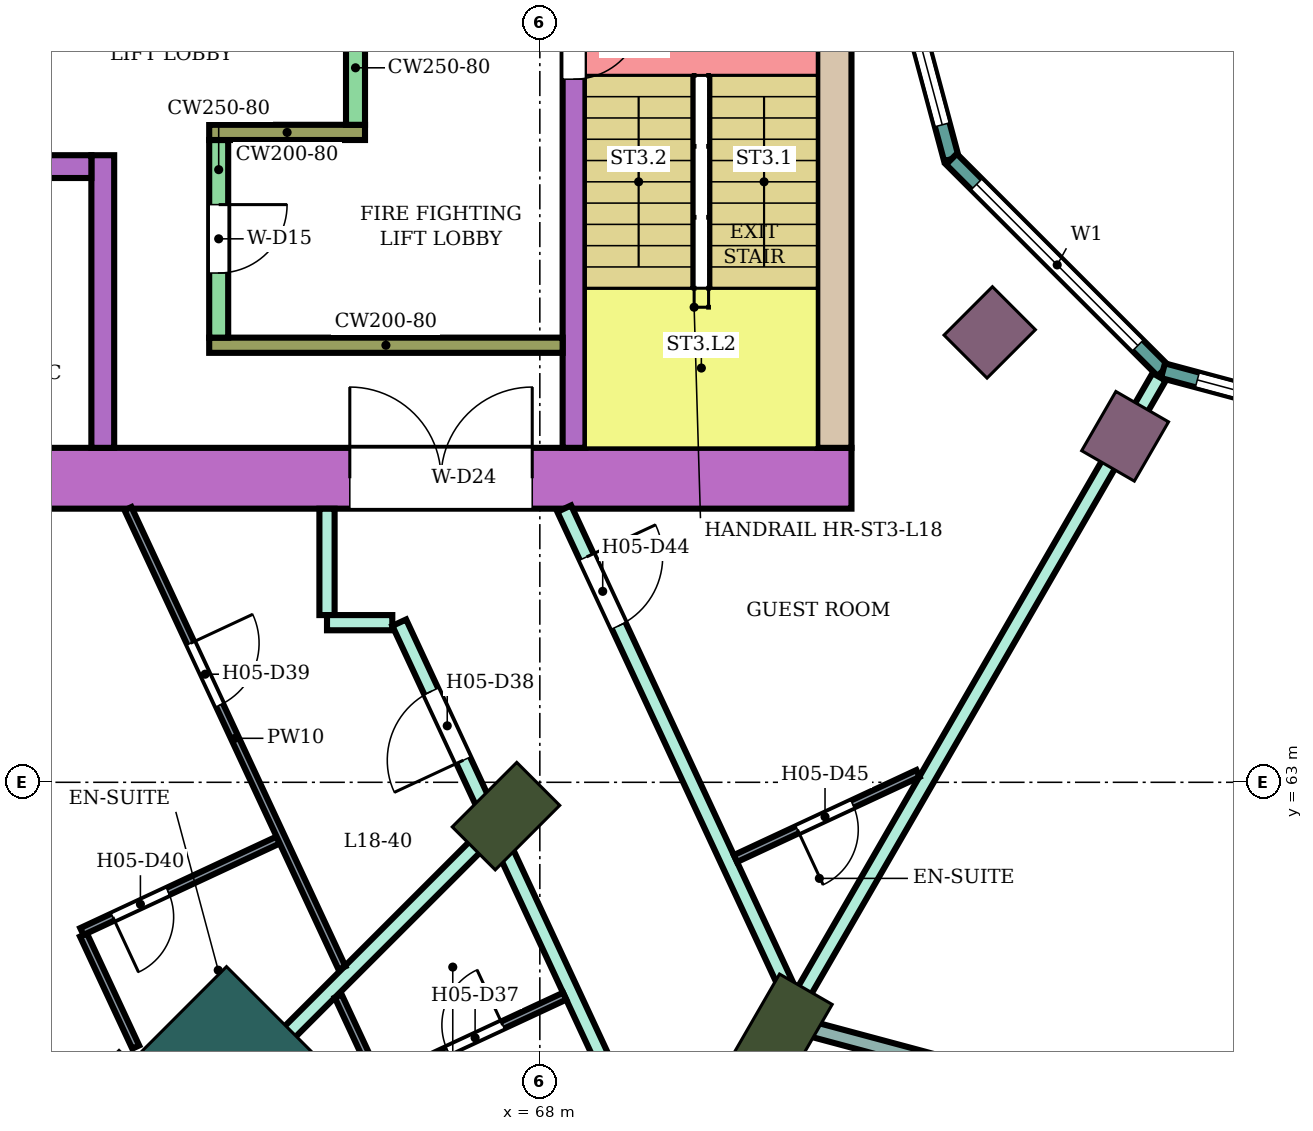
"""IFC4 building model, lengths in metres.
Left out: names, types, materials, properties, quantities, classifications, styles, units other than length and angle.
Written with IfcOpenShell. Run it as: python <this file> out.ifc"""

import sys

from ifc_helpers import new_model, si_unit, direction, frame, frame_2d, origin, origin_2d, place, context, subcontext, project, spatial, rectangle, extrude, element, fill, save


model = new_model("IFC4")
c1 = context("Model", 3, precision=1e-05, world=origin(), true_north=direction((0.0, 1.0)))
c2 = subcontext(c1, "Body", "Model", "MODEL_VIEW")
j1 = project(units=[si_unit("LENGTHUNIT", "METRE"), si_unit("PLANEANGLEUNIT", "RADIAN")], contexts=[c1])
p1 = place(None, origin())
s1 = spatial("IfcSite", under=j1, at=p1, CompositionType="ELEMENT")
p2 = place(p1, origin())
s2 = spatial("IfcBuilding", under=s1, at=p2, CompositionType="ELEMENT")
p3 = place(p2, frame((0.0, 0.0, 82.4)))
s3 = spatial("IfcBuildingStorey", under=s2, at=p3, CompositionType="ELEMENT", Elevation=82.4)
for number, where, z_axis, x_axis in (
    (1, (67.555, 62.555, 0.0), (0.0, 0.0, 1.0), (-0.707, -0.707, 0.0)),
    (2, (71.2, 59.758, 0.0), (0.0, 0.0, 1.0), (-0.5, -0.866, 0.0)),
):
    element("IfcColumn", number, at=place(p3, frame(where, z_axis=z_axis, x_axis=x_axis)), inside=s3, PredefinedType="COLUMN", context=c2, shape_type="SweptSolid", body=[
        extrude(rectangle(XDim=1.2, YDim=0.8, at=origin_2d()), origin(), (0.0, 0.0, 1.0), 3.8),
    ])
for number, where, z_axis, x_axis in (
    (3, (73.919, 68.919, 0.0), (0.0, 0.0, 1.0), (-0.707, -0.707, 0.0)),
    (4, (75.7, 67.552, 0.0), (0.0, 0.0, 1.0), (-0.5, -0.866, 0.0)),
):
    element("IfcColumn", number, at=place(p3, frame(where, z_axis=z_axis, x_axis=x_axis)), inside=s3, PredefinedType="COLUMN", context=c2, shape_type="SweptSolid", body=[
        extrude(rectangle(XDim=0.9, YDim=0.8, at=origin_2d()), origin(), (0.0, 0.0, 1.0), 3.8),
    ])
p4 = place(p3, frame((64.09, 59.09, 0.0), z_axis=(0.0, 0.0, 1.0), x_axis=(-0.707106781187, -0.707106781187, 0.0)))
e5 = element("IfcColumn", 5, at=p4, inside=s3, PredefinedType="COLUMN", context=c2, shape_type="SweptSolid", body=[
    extrude(rectangle(XDim=1.8, YDim=2.4, at=origin_2d()), origin(), (0.0, 0.0, 1.0), 3.8),
])
p5 = place(p3, frame((72.1, 67.0, 0.0), z_axis=(0.0, 0.0, 1.0), x_axis=(-1.0, 0.0, 0.0)))
e6 = element("IfcWall", 6, at=p5, inside=s3, PredefinedType="SHEAR", context=c2, shape_type="SweptSolid", body=[
    extrude(rectangle(XDim=14.7, YDim=0.8, at=frame_2d((7.35, 0.0))), origin(), (0.0, 0.0, 1.0), 3.48),
])
p6 = place(p5, frame((4.2, 0.0, 0.0)))
e7 = element("IfcOpeningElement", 7, at=p6, cuts=e6, PredefinedType="OPENING", context=c2, shape_type="SweptSolid", body=[
    extrude(rectangle(XDim=2.4, YDim=2.4, at=frame_2d((1.2, 1.2))), frame((0.0, 0.41, 0.0), z_axis=(0.0, -1.0, 0.0), x_axis=(1.0, 0.0, 0.0)), (0.0, 0.0, 1.0), 0.82),
])
p7 = place(p3, frame((71.875, 75.0, 0.0), z_axis=(0.0, 0.0, 1.0), x_axis=(0.0, -1.0, 0.0)))
e8 = element("IfcWall", 8, at=p7, inside=s3, PredefinedType="SHEAR", context=c2, shape_type="SweptSolid", body=[
    extrude(rectangle(XDim=7.6, YDim=0.45, at=frame_2d((3.8, 0.0))), origin(), (0.0, 0.0, 1.0), 3.48),
])
p8 = place(p3, frame((68.45, 75.0, 0.0), z_axis=(0.0, 0.0, 1.0), x_axis=(0.0, -1.0, 0.0)))
e9 = element("IfcWall", 9, at=p8, inside=s3, PredefinedType="SHEAR", context=c2, shape_type="SweptSolid", body=[
    extrude(rectangle(XDim=7.6, YDim=0.3, at=frame_2d((3.8, 0.0))), origin(), (0.0, 0.0, 1.0), 3.48),
])
p9 = place(p8, frame((1.85, 0.0, 0.0)))
e10 = element("IfcOpeningElement", 10, at=p9, cuts=e9, PredefinedType="OPENING", context=c2, shape_type="SweptSolid", body=[
    extrude(rectangle(XDim=0.9, YDim=2.1, at=frame_2d((0.45, 1.05))), frame((0.0, 0.16, 0.0), z_axis=(0.0, -1.0, 0.0), x_axis=(1.0, 0.0, 0.0)), (0.0, 0.0, 1.0), 0.32),
])
p10 = place(p3, frame((68.3, 68.75, 0.0), z_axis=(0.0, 0.0, 1.0), x_axis=(-1.0, 0.0, 0.0)))
e11 = element("IfcWall", 11, at=p10, inside=s3, PredefinedType="SHEAR", context=c2, shape_type="SweptSolid", body=[
    extrude(rectangle(XDim=4.65, YDim=0.2, at=frame_2d((2.325, 0.0))), origin(), (0.0, 0.0, 1.0), 3.48),
])
p11 = place(p3, frame((63.775, 71.45, 0.0), z_axis=(0.0, 0.0, 1.0), x_axis=(0.0, -1.0, 0.0)))
e12 = element("IfcWall", 12, at=p11, inside=s3, PredefinedType="SHEAR", context=c2, shape_type="SweptSolid", body=[
    extrude(rectangle(XDim=2.6, YDim=0.25, at=frame_2d((1.3, 0.0))), origin(), (0.0, 0.0, 1.0), 3.48),
])
p12 = place(p11, frame((0.85, 0.0, 0.0)))
e13 = element("IfcOpeningElement", 13, at=p12, cuts=e12, PredefinedType="OPENING", context=c2, shape_type="SweptSolid", body=[
    extrude(rectangle(XDim=0.9, YDim=2.1, at=frame_2d((0.45, 1.05))), frame((0.0, 0.135, 0.0), z_axis=(0.0, -1.0, 0.0), x_axis=(1.0, 0.0, 0.0)), (0.0, 0.0, 1.0), 0.27),
])
p13 = place(p3, frame((65.7, 71.55, 0.0), z_axis=(0.0, 0.0, 1.0), x_axis=(-1.0, 0.0, 0.0)))
e14 = element("IfcWall", 14, at=p13, inside=s3, PredefinedType="SHEAR", context=c2, shape_type="SweptSolid", body=[
    extrude(rectangle(XDim=2.05, YDim=0.2, at=frame_2d((1.025, 0.0))), origin(), (0.0, 0.0, 1.0), 3.48),
])
p14 = place(p3, frame((65.575, 73.15, 0.0), z_axis=(0.0, 0.0, 1.0), x_axis=(0.0, -1.0, 0.0)))
e15 = element("IfcWall", 15, at=p14, inside=s3, PredefinedType="SHEAR", context=c2, shape_type="SweptSolid", body=[
    extrude(rectangle(XDim=1.5, YDim=0.25, at=frame_2d((0.75, 0.0))), origin(), (0.0, 0.0, 1.0), 3.48),
])
p15 = place(p3, frame((62.25, 71.25, 0.0), z_axis=(0.0, 0.0, 1.0), x_axis=(0.0, -1.0, 0.0)))
e16 = element("IfcWall", 16, at=p15, inside=s3, PredefinedType="SHEAR", context=c2, shape_type="SweptSolid", body=[
    extrude(rectangle(XDim=3.85, YDim=0.3, at=frame_2d((1.925, 0.0))), origin(), (0.0, 0.0, 1.0), 3.48),
])
p16 = place(p3, frame((62.1, 71.1, 0.0), z_axis=(0.0, 0.0, 1.0), x_axis=(-1.0, 0.0, 0.0)))
e17 = element("IfcWall", 17, at=p16, inside=s3, PredefinedType="SHEAR", context=c2, shape_type="SweptSolid", body=[
    extrude(rectangle(XDim=4.7, YDim=0.3, at=frame_2d((2.35, 0.0))), origin(), (0.0, 0.0, 1.0), 3.48),
])
p17 = place(p16, frame((0.725, 0.0, 0.0)))
e18 = element("IfcOpeningElement", 18, at=p17, cuts=e17, PredefinedType="OPENING", context=c2, shape_type="SweptSolid", body=[
    extrude(rectangle(XDim=0.9, YDim=2.1, at=frame_2d((0.45, 1.05))), frame((0.0, 0.16, 0.0), z_axis=(0.0, -1.0, 0.0), x_axis=(1.0, 0.0, 0.0)), (0.0, 0.0, 1.0), 0.32),
])
p18 = place(p16, frame((3.075, 0.0, 0.0)))
e19 = element("IfcOpeningElement", 19, at=p18, cuts=e17, PredefinedType="OPENING", context=c2, shape_type="SweptSolid", body=[
    extrude(rectangle(XDim=0.9, YDim=2.1, at=frame_2d((0.45, 1.05))), frame((0.0, 0.16, 0.0), z_axis=(0.0, -1.0, 0.0), x_axis=(1.0, 0.0, 0.0)), (0.0, 0.0, 1.0), 0.32),
])
p19 = place(p3, frame((72.396, 75.0, 0.0), z_axis=(0.0, 0.0, 1.0), x_axis=(0.258789828301, -0.965933654434, 0.0)))
e20 = element("IfcWall", 20, at=p19, inside=s3, PredefinedType="NOTDEFINED", context=c2, shape_type="SweptSolid", body=[
    extrude(rectangle(XDim=3.936, YDim=0.2, at=frame_2d((1.968, 0.0))), origin(), (0.0, 0.0, 1.0), 3.8),
])
p20 = place(p19, frame((0.468, 0.0, 0.9)))
e21 = element("IfcOpeningElement", 21, at=p20, cuts=e20, PredefinedType="OPENING", context=c2, shape_type="SweptSolid", body=[
    extrude(rectangle(XDim=3.0, YDim=2.3, at=frame_2d((1.5, 1.15))), frame((0.0, 0.11, 0.0), z_axis=(0.0, -1.0, 0.0), x_axis=(1.0, 0.0, 0.0)), (0.0, 0.0, 1.0), 0.22),
])
p21 = place(p3, frame((73.415, 71.198, 0.0), z_axis=(0.0, 0.0, 1.0), x_axis=(0.707106781187, -0.707106781187, 0.0)))
e22 = element("IfcWall", 22, at=p21, inside=s3, PredefinedType="NOTDEFINED", context=c2, shape_type="SweptSolid", body=[
    extrude(rectangle(XDim=3.936, YDim=0.2, at=frame_2d((1.968, 0.0))), origin(), (0.0, 0.0, 1.0), 3.8),
])
p22 = place(p21, frame((0.468, 0.0, 0.9)))
e23 = element("IfcOpeningElement", 23, at=p22, cuts=e22, PredefinedType="OPENING", context=c2, shape_type="SweptSolid", body=[
    extrude(rectangle(XDim=3.0, YDim=2.3, at=frame_2d((1.5, 1.15))), frame((0.0, 0.11, 0.0), z_axis=(0.0, -1.0, 0.0), x_axis=(1.0, 0.0, 0.0)), (0.0, 0.0, 1.0), 0.22),
])
p23 = place(p3, frame((76.198, 68.415, 0.0), z_axis=(0.0, 0.0, 1.0), x_axis=(0.965933654434, -0.258789828301, 0.0)))
e24 = element("IfcWall", 24, at=p23, inside=s3, PredefinedType="NOTDEFINED", context=c2, shape_type="SweptSolid", body=[
    extrude(rectangle(XDim=3.936, YDim=0.2, at=frame_2d((1.968, 0.0))), origin(), (0.0, 0.0, 1.0), 3.8),
])
p24 = place(p23, frame((0.468, 0.0, 0.9)))
e25 = element("IfcOpeningElement", 25, at=p24, cuts=e24, PredefinedType="OPENING", context=c2, shape_type="SweptSolid", body=[
    extrude(rectangle(XDim=3.0, YDim=2.3, at=frame_2d((1.5, 1.15))), frame((0.0, 0.11, 0.0), z_axis=(0.0, -1.0, 0.0), x_axis=(1.0, 0.0, 0.0)), (0.0, 0.0, 1.0), 0.22),
])
p25 = place(p3, frame((63.593, 58.599, 0.0), z_axis=(0.0, 0.0, 1.0), x_axis=(0.707292874152, 0.706920639233, 0.0)))
e26 = element("IfcWall", 26, at=p25, inside=s3, PredefinedType="PARTITIONING", context=c2, shape_type="SweptSolid", body=[
    extrude(rectangle(XDim=5.247, YDim=0.2, at=frame_2d((2.624, 0.0))), origin(), (0.0, 0.0, 1.0), 3.35),
])
p26 = place(p3, frame((65.2, 65.2, 0.0), z_axis=(0.0, 0.0, 1.0), x_axis=(0.0, 1.0, 0.0)))
e27 = element("IfcWall", 27, at=p26, inside=s3, PredefinedType="PARTITIONING", context=c2, shape_type="SweptSolid", body=[
    extrude(rectangle(XDim=1.399, YDim=0.2, at=frame_2d((0.7, 0.0))), origin(), (0.0, 0.0, 1.0), 3.35),
])
p27 = place(p3, frame((65.2, 65.1, 0.0), z_axis=(0.0, 0.0, 1.0), x_axis=(1.0, 0.0, 0.0)))
e28 = element("IfcWall", 28, at=p27, inside=s3, PredefinedType="PARTITIONING", context=c2, shape_type="SweptSolid", body=[
    extrude(rectangle(XDim=0.859, YDim=0.2, at=frame_2d((0.43, 0.0))), origin(), (0.0, 0.0, 1.0), 3.35),
])
p28 = place(p3, frame((66.15, 65.1, 0.0), z_axis=(0.0, 0.0, 1.0), x_axis=(0.421874842351, -0.906654078131, 0.0)))
e29 = element("IfcWall", 29, at=p28, inside=s3, PredefinedType="PARTITIONING", context=c2, shape_type="SweptSolid", body=[
    extrude(rectangle(XDim=8.228, YDim=0.2, at=frame_2d((4.114, 0.0))), origin(), (0.0, 0.0, 1.0), 3.35),
])
p29 = place(p28, frame((6.748, 0.0, 0.0)))
e30 = element("IfcOpeningElement", 30, at=p29, cuts=e29, PredefinedType="OPENING", context=c2, shape_type="SweptSolid", body=[
    extrude(rectangle(XDim=1.0, YDim=2.1, at=frame_2d((0.5, 1.05))), frame((0.0, 0.11, 0.0), z_axis=(0.0, -1.0, 0.0), x_axis=(1.0, 0.0, 0.0)), (0.0, 0.0, 1.0), 0.22),
])
p30 = place(p28, frame((0.997, 0.0, 0.0)))
e31 = element("IfcOpeningElement", 31, at=p30, cuts=e29, PredefinedType="OPENING", context=c2, shape_type="SweptSolid", body=[
    extrude(rectangle(XDim=1.0, YDim=2.1, at=frame_2d((0.5, 1.05))), frame((0.0, 0.11, 0.0), z_axis=(0.0, -1.0, 0.0), x_axis=(1.0, 0.0, 0.0)), (0.0, 0.0, 1.0), 0.22),
])
p31 = place(p3, frame((68.321, 66.6, 0.0), z_axis=(0.0, 0.0, 1.0), x_axis=(0.421914092414, -0.906635813666, 0.0)))
e32 = element("IfcWall", 32, at=p31, inside=s3, PredefinedType="PARTITIONING", context=c2, shape_type="SweptSolid", body=[
    extrude(rectangle(XDim=7.459, YDim=0.2, at=frame_2d((3.73, 0.0))), origin(), (0.0, 0.0, 1.0), 3.35),
])
p32 = place(p31, frame((0.7, 0.0, 0.0)))
e33 = element("IfcOpeningElement", 33, at=p32, cuts=e32, PredefinedType="OPENING", context=c2, shape_type="SweptSolid", body=[
    extrude(rectangle(XDim=1.0, YDim=2.1, at=frame_2d((0.5, 1.05))), frame((0.0, 0.11, 0.0), z_axis=(0.0, -1.0, 0.0), x_axis=(1.0, 0.0, 0.0)), (0.0, 0.0, 1.0), 0.22),
])
p33 = place(p3, frame((71.459, 60.218, 0.0), z_axis=(0.0, 0.0, 1.0), x_axis=(0.500232027118, 0.865891401416, 0.0)))
e34 = element("IfcWall", 34, at=p33, inside=s3, PredefinedType="PARTITIONING", context=c2, shape_type="SweptSolid", body=[
    extrude(rectangle(XDim=9.372, YDim=0.2, at=frame_2d((4.686, 0.0))), origin(), (0.0, 0.0, 1.0), 3.35),
])
p34 = place(p3, frame((71.498, 59.774, 0.0), z_axis=(0.0, 0.0, 1.0), x_axis=(0.965911938046, -0.258870871168, 0.0)))
e35 = element("IfcWall", 35, at=p34, inside=s3, PredefinedType="PARTITIONING", context=c2, shape_type="SweptSolid", body=[
    extrude(rectangle(XDim=8.752, YDim=0.2, at=frame_2d((4.376, 0.0))), origin(), (0.0, 0.0, 1.0), 2.98),
])
p35 = place(p34, frame((4.701, 0.0, 0.0)))
e36 = element("IfcOpeningElement", 36, at=p35, cuts=e35, PredefinedType="OPENING", context=c2, shape_type="SweptSolid", body=[
    extrude(rectangle(XDim=1.8, YDim=2.1, at=frame_2d((0.9, 1.05))), frame((0.0, 0.11, 0.0), z_axis=(0.0, -1.0, 0.0), x_axis=(1.0, 0.0, 0.0)), (0.0, 0.0, 1.0), 0.22),
])
p36 = place(p3, frame((61.996, 60.992, 0.0), z_axis=(0.0, 0.0, 1.0), x_axis=(0.422318684634, -0.906447421867, 0.0)))
e37 = element("IfcWall", 37, at=p36, inside=s3, PredefinedType="PARTITIONING", context=c2, shape_type="SweptSolid", body=[
    extrude(rectangle(XDim=1.627, YDim=0.1, at=frame_2d((0.814, 0.0))), origin(), (0.0, 0.0, 1.0), 3.35),
])
p37 = place(p3, frame((61.975, 61.037, 0.0), z_axis=(0.0, 0.0, 1.0), x_axis=(0.906360368959, 0.422505481125, 0.0)))
e38 = element("IfcWall", 38, at=p37, inside=s3, PredefinedType="PARTITIONING", context=c2, shape_type="SweptSolid", body=[
    extrude(rectangle(XDim=2.849, YDim=0.1, at=frame_2d((1.425, 0.0))), origin(), (0.0, 0.0, 1.0), 3.35),
])
p38 = place(p37, frame((0.45, 0.0, 0.0)))
e39 = element("IfcOpeningElement", 39, at=p38, cuts=e38, PredefinedType="OPENING", context=c2, shape_type="SweptSolid", body=[
    extrude(rectangle(XDim=0.8, YDim=2.1, at=frame_2d((0.4, 1.05))), frame((0.0, 0.06, 0.0), z_axis=(0.0, -1.0, 0.0), x_axis=(1.0, 0.0, 0.0)), (0.0, 0.0, 1.0), 0.12),
])
p39 = place(p3, frame((62.582, 66.6, 0.0), z_axis=(0.0, 0.0, 1.0), x_axis=(0.422283870085, -0.906463641337, 0.0)))
e40 = element("IfcWall", 40, at=p39, inside=s3, PredefinedType="PARTITIONING", context=c2, shape_type="SweptSolid", body=[
    extrude(rectangle(XDim=6.666, YDim=0.1, at=frame_2d((3.333, 0.0))), origin(), (0.0, 0.0, 1.0), 3.35),
])
p40 = place(p39, frame((1.953, 0.0, 0.0)))
e41 = element("IfcOpeningElement", 41, at=p40, cuts=e40, PredefinedType="OPENING", context=c2, shape_type="SweptSolid", body=[
    extrude(rectangle(XDim=0.9, YDim=2.1, at=frame_2d((0.45, 1.05))), frame((0.0, 0.06, 0.0), z_axis=(0.0, -1.0, 0.0), x_axis=(1.0, 0.0, 0.0)), (0.0, 0.0, 1.0), 0.12),
])
p41 = place(p3, frame((65.348, 60.188, 0.0), z_axis=(0.0, 0.0, 1.0), x_axis=(0.422387529151, -0.906415343657, 0.0)))
e42 = element("IfcWall", 42, at=p41, inside=s3, PredefinedType="PARTITIONING", context=c2, shape_type="SweptSolid", body=[
    extrude(rectangle(XDim=1.208, YDim=0.1, at=frame_2d((0.604, 0.0))), origin(), (0.0, 0.0, 1.0), 3.35),
])
p42 = place(p3, frame((65.879, 59.048, 0.0), z_axis=(0.0, 0.0, 1.0), x_axis=(0.906746039995, 0.421677150144, 0.0)))
e43 = element("IfcWall", 43, at=p42, inside=s3, PredefinedType="PARTITIONING", context=c2, shape_type="SweptSolid", body=[
    extrude(rectangle(XDim=2.7, YDim=0.1, at=frame_2d((1.35, 0.0))), origin(), (0.0, 0.0, 1.0), 3.35),
])
p43 = place(p42, frame((1.0, 0.0, 0.0)))
e44 = element("IfcOpeningElement", 44, at=p43, cuts=e43, PredefinedType="OPENING", context=c2, shape_type="SweptSolid", body=[
    extrude(rectangle(XDim=0.8, YDim=2.1, at=frame_2d((0.4, 1.05))), frame((0.0, 0.06, 0.0), z_axis=(0.0, -1.0, 0.0), x_axis=(1.0, 0.0, 0.0)), (0.0, 0.0, 1.0), 0.12),
])
p44 = place(p3, frame((70.574, 61.997, 0.0), z_axis=(0.0, 0.0, 1.0), x_axis=(0.906503026865, 0.422199315826, 0.0)))
e45 = element("IfcWall", 45, at=p44, inside=s3, PredefinedType="PARTITIONING", context=c2, shape_type="SweptSolid", body=[
    extrude(rectangle(XDim=2.65, YDim=0.1, at=frame_2d((1.325, 0.0))), origin(), (0.0, 0.0, 1.0), 3.35),
])
p45 = place(p44, frame((0.9, 0.0, 0.0)))
e46 = element("IfcOpeningElement", 46, at=p45, cuts=e45, PredefinedType="OPENING", context=c2, shape_type="SweptSolid", body=[
    extrude(rectangle(XDim=0.8, YDim=2.1, at=frame_2d((0.4, 1.05))), frame((0.0, 0.06, 0.0), z_axis=(0.0, -1.0, 0.0), x_axis=(1.0, 0.0, 0.0)), (0.0, 0.0, 1.0), 0.12),
])
p46 = place(p20, origin())
e47 = element("IfcWindow", 47, at=p46, inside=s3, PartitioningType="SINGLE_PANEL", PredefinedType="WINDOW", context=c2, shape_type="SweptSolid", body=[
    extrude(rectangle(XDim=3.0, YDim=2.3, at=frame_2d((1.5, 1.15))), frame((0.0, 0.03, 0.0), z_axis=(0.0, -1.0, 0.0), x_axis=(1.0, 0.0, 0.0)), (0.0, 0.0, 1.0), 0.06),
])
fill(e21, e47)
p47 = place(p22, origin())
e48 = element("IfcWindow", 48, at=p47, inside=s3, PartitioningType="SINGLE_PANEL", PredefinedType="WINDOW", context=c2, shape_type="SweptSolid", body=[
    extrude(rectangle(XDim=3.0, YDim=2.3, at=frame_2d((1.5, 1.15))), frame((0.0, 0.03, 0.0), z_axis=(0.0, -1.0, 0.0), x_axis=(1.0, 0.0, 0.0)), (0.0, 0.0, 1.0), 0.06),
])
fill(e23, e48)
p48 = place(p24, origin())
e49 = element("IfcWindow", 49, at=p48, inside=s3, PartitioningType="SINGLE_PANEL", PredefinedType="WINDOW", context=c2, shape_type="SweptSolid", body=[
    extrude(rectangle(XDim=3.0, YDim=2.3, at=frame_2d((1.5, 1.15))), frame((0.0, 0.03, 0.0), z_axis=(0.0, -1.0, 0.0), x_axis=(1.0, 0.0, 0.0)), (0.0, 0.0, 1.0), 0.06),
])
fill(e25, e49)
p49 = place(p43, origin())
e50 = element("IfcDoor", 50, at=p49, inside=s3, OperationType="SINGLE_SWING_RIGHT", PredefinedType="DOOR", context=c2, shape_type="SweptSolid", body=[
    extrude(rectangle(XDim=0.8, YDim=2.1, at=frame_2d((0.4, 1.05))), frame((0.0, 0.025, 0.0), z_axis=(0.0, -1.0, 0.0), x_axis=(1.0, 0.0, 0.0)), (0.0, 0.0, 1.0), 0.05),
])
fill(e44, e50)
p50 = place(p30, frame((1.0, 0.0, 0.0), z_axis=(0.0, 0.0, 1.0), x_axis=(-1.0, 0.0, 0.0)))
e51 = element("IfcDoor", 51, at=p50, inside=s3, OperationType="SINGLE_SWING_LEFT", PredefinedType="DOOR", context=c2, shape_type="SweptSolid", body=[
    extrude(rectangle(XDim=1.0, YDim=2.1, at=frame_2d((0.5, 1.05))), frame((0.0, 0.025, 0.0), z_axis=(0.0, -1.0, 0.0), x_axis=(1.0, 0.0, 0.0)), (0.0, 0.0, 1.0), 0.05),
])
fill(e31, e51)
p51 = place(p40, origin())
e52 = element("IfcDoor", 52, at=p51, inside=s3, OperationType="SINGLE_SWING_LEFT", PredefinedType="DOOR", context=c2, shape_type="SweptSolid", body=[
    extrude(rectangle(XDim=0.9, YDim=2.1, at=frame_2d((0.45, 1.05))), frame((0.0, 0.025, 0.0), z_axis=(0.0, -1.0, 0.0), x_axis=(1.0, 0.0, 0.0)), (0.0, 0.0, 1.0), 0.05),
])
fill(e41, e52)
p52 = place(p38, frame((0.8, 0.0, 0.0), z_axis=(0.0, 0.0, 1.0), x_axis=(-1.0, 0.0, 0.0)))
e53 = element("IfcDoor", 53, at=p52, inside=s3, OperationType="SINGLE_SWING_RIGHT", PredefinedType="DOOR", context=c2, shape_type="SweptSolid", body=[
    extrude(rectangle(XDim=0.8, YDim=2.1, at=frame_2d((0.4, 1.05))), frame((0.0, 0.025, 0.0), z_axis=(0.0, -1.0, 0.0), x_axis=(1.0, 0.0, 0.0)), (0.0, 0.0, 1.0), 0.05),
])
fill(e39, e53)
p53 = place(p32, origin())
e54 = element("IfcDoor", 54, at=p53, inside=s3, OperationType="SINGLE_SWING_LEFT", PredefinedType="DOOR", context=c2, shape_type="SweptSolid", body=[
    extrude(rectangle(XDim=1.0, YDim=2.1, at=frame_2d((0.5, 1.05))), frame((0.0, 0.025, 0.0), z_axis=(0.0, -1.0, 0.0), x_axis=(1.0, 0.0, 0.0)), (0.0, 0.0, 1.0), 0.05),
])
fill(e33, e54)
p54 = place(p45, frame((0.8, 0.0, 0.0), z_axis=(0.0, 0.0, 1.0), x_axis=(-1.0, 0.0, 0.0)))
e55 = element("IfcDoor", 55, at=p54, inside=s3, OperationType="SINGLE_SWING_RIGHT", PredefinedType="DOOR", context=c2, shape_type="SweptSolid", body=[
    extrude(rectangle(XDim=0.8, YDim=2.1, at=frame_2d((0.4, 1.05))), frame((0.0, 0.025, 0.0), z_axis=(0.0, -1.0, 0.0), x_axis=(1.0, 0.0, 0.0)), (0.0, 0.0, 1.0), 0.05),
])
fill(e46, e55)
p55 = place(p9, origin())
e56 = element("IfcDoor", 56, at=p55, inside=s3, OperationType="SINGLE_SWING_LEFT", PredefinedType="DOOR", context=c2, shape_type="SweptSolid", body=[
    extrude(rectangle(XDim=0.9, YDim=2.1, at=frame_2d((0.45, 1.05))), frame((0.0, 0.025, 0.0), z_axis=(0.0, -1.0, 0.0), x_axis=(1.0, 0.0, 0.0)), (0.0, 0.0, 1.0), 0.05),
])
fill(e10, e56)
p56 = place(p12, origin())
e57 = element("IfcDoor", 57, at=p56, inside=s3, OperationType="SINGLE_SWING_LEFT", PredefinedType="DOOR", context=c2, shape_type="SweptSolid", body=[
    extrude(rectangle(XDim=0.9, YDim=2.1, at=frame_2d((0.45, 1.05))), frame((0.0, 0.025, 0.0), z_axis=(0.0, -1.0, 0.0), x_axis=(1.0, 0.0, 0.0)), (0.0, 0.0, 1.0), 0.05),
])
fill(e13, e57)
p57 = place(p6, frame((2.4, 0.0, 0.0), z_axis=(0.0, 0.0, 1.0), x_axis=(-1.0, 0.0, 0.0)))
e58 = element("IfcDoor", 58, at=p57, inside=s3, OperationType="DOUBLE_DOOR_SINGLE_SWING", PredefinedType="DOOR", context=c2, shape_type="SweptSolid", body=[
    extrude(rectangle(XDim=2.4, YDim=2.4, at=frame_2d((1.2, 1.2))), frame((0.0, 0.025, 0.0), z_axis=(0.0, -1.0, 0.0), x_axis=(1.0, 0.0, 0.0)), (0.0, 0.0, 1.0), 0.05),
])
fill(e7, e58)
save(model, sys.argv[1])
